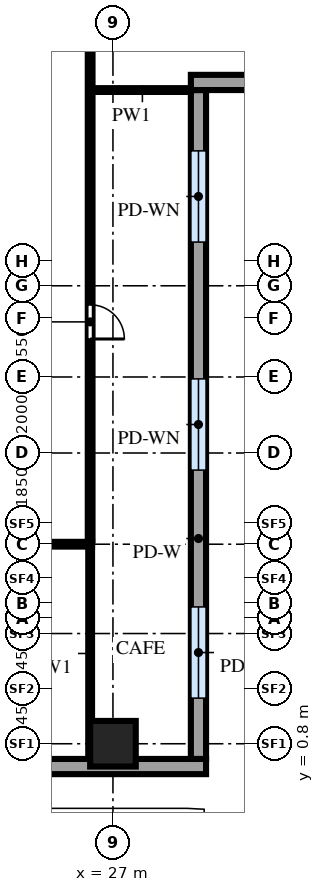
"""IFC4 building model, lengths in metres.
Left out: names, types, materials, properties, quantities, classifications, styles, units other than length and angle.
Written with IfcOpenShell. Run it as: python <this file> out.ifc"""

import sys

from ifc_helpers import new_model, si_unit, direction, frame, frame_2d, origin, origin_2d, place, context, subcontext, project, spatial, rectangle, extrude, source, transform, mapped, element, fill, save


model = new_model("IFC4")
c1 = context("Model", 3, precision=1e-05, world=origin(), true_north=direction((0.0, 1.0)))
c2 = subcontext(c1, "Body", "Model", "MODEL_VIEW")
j1 = project(units=[si_unit("LENGTHUNIT", "METRE"), si_unit("PLANEANGLEUNIT", "RADIAN")], contexts=[c1])
p1 = place(None, origin())
s1 = spatial("IfcSite", under=j1, at=p1, CompositionType="ELEMENT")
p2 = place(p1, origin())
s2 = spatial("IfcBuilding", under=s1, at=p2, CompositionType="ELEMENT")
p3 = place(p2, frame((0.0, 0.0, 7.5)))
s3 = spatial("IfcBuildingStorey", under=s2, at=p3, CompositionType="ELEMENT", Elevation=7.5)
m1 = source(origin(), c2, "Body", "SweptSolid", [
    extrude(rectangle(XDim=1.2, YDim=1.2, at=origin_2d()), origin(), (0.0, 0.0, 1.0), 5.2),
])
p4 = place(p3, frame((27.0, 0.8, 0.0), z_axis=(0.0, 0.0, 1.0), x_axis=(1.0, 0.0, 0.0)))
e1 = element("IfcColumn", 1, at=p4, inside=s3, PredefinedType="COLUMN", context=c2, shape_type="MappedRepresentation", body=[
    mapped(m1, transform((0.0, 0.0, 0.0))),
])
m2 = source(origin(), c2, "Body", "SweptSolid", [
    extrude(rectangle(XDim=31.24, YDim=0.4, at=frame_2d((15.62, 0.0))), origin(), (0.0, 0.0, 1.0), 5.2),
])
p5 = place(p3, frame((-1.79, 0.2, 0.0), z_axis=(0.0, 0.0, 1.0), x_axis=(1.0, 0.0, 0.0)))
e2 = element("IfcWall", 2, at=p5, inside=s3, PredefinedType="SOLIDWALL", context=c2, shape_type="MappedRepresentation", body=[
    mapped(m2, transform((0.0, 0.0, 0.0))),
])
m3 = source(origin(), c2, "Body", "SweptSolid", [
    extrude(rectangle(XDim=2.4, YDim=2.4, at=frame_2d((1.2, 1.2))), frame((0.0, 0.21, 0.0), z_axis=(0.0, -1.0, 0.0), x_axis=(1.0, 0.0, 0.0)), (0.0, 0.0, 1.0), 0.42),
])
p6 = place(p5, frame((2.4, 0.0, 1.0)))
e3 = element("IfcOpeningElement", 3, at=p6, cuts=e2, PredefinedType="OPENING", context=c2, shape_type="MappedRepresentation", body=[
    mapped(m3, transform((0.0, 0.0, 0.0))),
])
p7 = place(p5, frame((8.4, 0.0, 1.0)))
e4 = element("IfcOpeningElement", 4, at=p7, cuts=e2, PredefinedType="OPENING", context=c2, shape_type="MappedRepresentation", body=[
    mapped(m3, transform((0.0, 0.0, 0.0))),
])
m4 = source(origin(), c2, "Body", "SweptSolid", [
    extrude(rectangle(XDim=17.6, YDim=0.4, at=frame_2d((8.8, 0.0))), origin(), (0.0, 0.0, 1.0), 5.2),
])
p8 = place(p3, frame((29.25, 0.4, 0.0), z_axis=(0.0, 0.0, 1.0), x_axis=(0.0, 1.0, 0.0)))
e5 = element("IfcWall", 5, at=p8, inside=s3, PredefinedType="SOLIDWALL", context=c2, shape_type="MappedRepresentation", body=[
    mapped(m4, transform((0.0, 0.0, 0.0))),
])
p9 = place(p8, frame((1.6, 0.0, 1.0)))
e6 = element("IfcOpeningElement", 6, at=p9, cuts=e5, PredefinedType="OPENING", context=c2, shape_type="MappedRepresentation", body=[
    mapped(m3, transform((0.0, 0.0, 0.0))),
])
p10 = place(p8, frame((7.6, 0.0, 1.0)))
e7 = element("IfcOpeningElement", 7, at=p10, cuts=e5, PredefinedType="OPENING", context=c2, shape_type="MappedRepresentation", body=[
    mapped(m3, transform((0.0, 0.0, 0.0))),
])
p11 = place(p8, frame((13.6, 0.0, 1.0)))
e8 = element("IfcOpeningElement", 8, at=p11, cuts=e5, PredefinedType="OPENING", context=c2, shape_type="MappedRepresentation", body=[
    mapped(m3, transform((0.0, 0.0, 0.0))),
])
m5 = source(origin(), c2, "Body", "SweptSolid", [
    extrude(rectangle(XDim=13.5, YDim=0.4, at=frame_2d((6.75, 0.0))), origin(), (0.0, 0.0, 1.0), 5.2),
])
p12 = place(p3, frame((29.05, 18.2, 0.0), z_axis=(0.0, 0.0, 1.0), x_axis=(1.0, 0.0, 0.0)))
e9 = element("IfcWall", 9, at=p12, inside=s3, PredefinedType="SOLIDWALL", context=c2, shape_type="MappedRepresentation", body=[
    mapped(m5, transform((0.0, 0.0, 0.0))),
])
p13 = place(p12, frame((2.55, 0.0, 1.0)))
e10 = element("IfcOpeningElement", 10, at=p13, cuts=e9, PredefinedType="OPENING", context=c2, shape_type="MappedRepresentation", body=[
    mapped(m3, transform((0.0, 0.0, 0.0))),
])
p14 = place(p12, frame((8.55, 0.0, 1.0)))
e11 = element("IfcOpeningElement", 11, at=p14, cuts=e9, PredefinedType="OPENING", context=c2, shape_type="MappedRepresentation", body=[
    mapped(m3, transform((0.0, 0.0, 0.0))),
])
m6 = source(origin(), c2, "Body", "SweptSolid", [
    extrude(rectangle(XDim=5.55, YDim=0.1, at=frame_2d((2.775, 0.0))), origin(), (0.0, 0.0, 1.0), 5.2),
])
p15 = place(p3, frame((26.4, 0.4, 0.0), z_axis=(0.0, 0.0, 1.0), x_axis=(0.0, 1.0, 0.0)))
e12 = element("IfcWall", 12, at=p15, inside=s3, PredefinedType="PARTITIONING", context=c2, shape_type="MappedRepresentation", body=[
    mapped(m6, transform((0.0, 0.0, 0.0))),
])
m7 = source(origin(), c2, "Body", "SweptSolid", [
    extrude(rectangle(XDim=22.3, YDim=0.125, at=frame_2d((11.15, 0.0))), origin(), (0.0, 0.0, 1.0), 5.2),
])
p16 = place(p3, frame((4.15, 6.05, 0.0), z_axis=(0.0, 0.0, 1.0), x_axis=(1.0, 0.0, 0.0)))
e13 = element("IfcWall", 13, at=p16, inside=s3, PredefinedType="PARTITIONING", context=c2, shape_type="MappedRepresentation", body=[
    mapped(m7, transform((0.0, 0.0, 0.0))),
])
m8 = source(origin(), c2, "Body", "SweptSolid", [
    extrude(rectangle(XDim=1.2, YDim=2.1, at=frame_2d((0.6, 1.05))), frame((0.0, 0.073, 0.0), z_axis=(0.0, -1.0, 0.0), x_axis=(1.0, 0.0, 0.0)), (0.0, 0.0, 1.0), 0.145),
])
p17 = place(p16, frame((9.2, 0.0, 0.0)))
e14 = element("IfcOpeningElement", 14, at=p17, cuts=e13, PredefinedType="OPENING", context=c2, shape_type="MappedRepresentation", body=[
    mapped(m8, transform((0.0, 0.0, 0.0))),
])
m9 = source(origin(), c2, "Body", "SweptSolid", [
    extrude(rectangle(XDim=27.15, YDim=0.125, at=frame_2d((13.575, 0.0))), origin(), (0.0, 0.0, 1.0), 5.2),
])
p18 = place(p3, frame((26.4, 6.15, 0.0), z_axis=(0.0, 0.0, 1.0), x_axis=(0.0, 1.0, 0.0)))
e15 = element("IfcWall", 15, at=p18, inside=s3, PredefinedType="PARTITIONING", context=c2, shape_type="MappedRepresentation", body=[
    mapped(m9, transform((0.0, 0.0, 0.0))),
])
m10 = source(origin(), c2, "Body", "SweptSolid", [
    extrude(rectangle(XDim=0.9, YDim=2.1, at=frame_2d((0.45, 1.05))), frame((0.0, 0.073, 0.0), z_axis=(0.0, -1.0, 0.0), x_axis=(1.0, 0.0, 0.0)), (0.0, 0.0, 1.0), 0.145),
])
p19 = place(p18, frame((5.3, 0.0, 0.0)))
e16 = element("IfcOpeningElement", 16, at=p19, cuts=e15, PredefinedType="OPENING", context=c2, shape_type="MappedRepresentation", body=[
    mapped(m10, transform((0.0, 0.0, 0.0))),
])
p20 = place(p18, frame((13.25, 0.0, 0.0)))
e17 = element("IfcOpeningElement", 17, at=p20, cuts=e15, PredefinedType="OPENING", context=c2, shape_type="MappedRepresentation", body=[
    mapped(m8, transform((0.0, 0.0, 0.0))),
])
m11 = source(origin(), c2, "Body", "SweptSolid", [
    extrude(rectangle(XDim=2.55, YDim=0.1, at=frame_2d((1.275, 0.0))), origin(), (0.0, 0.0, 1.0), 5.2),
])
p21 = place(p3, frame((26.5, 18.0, 0.0), z_axis=(0.0, 0.0, 1.0), x_axis=(1.0, 0.0, 0.0)))
e18 = element("IfcWall", 18, at=p21, inside=s3, PredefinedType="PARTITIONING", context=c2, shape_type="MappedRepresentation", body=[
    mapped(m11, transform((0.0, 0.0, 0.0))),
])
m12 = source(origin(), c2, "Body", "SweptSolid", [
    extrude(rectangle(XDim=2.4, YDim=2.4, at=frame_2d((1.2, 1.2))), frame((0.0, 0.03, 0.0), z_axis=(0.0, -1.0, 0.0), x_axis=(1.0, 0.0, 0.0)), (0.0, 0.0, 1.0), 0.06),
])
p22 = place(p9, origin())
e19 = element("IfcWindow", 19, at=p22, inside=s3, PartitioningType="SINGLE_PANEL", PredefinedType="WINDOW", context=c2, shape_type="MappedRepresentation", body=[
    mapped(m12, transform((0.0, 0.0, 0.0))),
])
fill(e6, e19)
p23 = place(p10, origin())
e20 = element("IfcWindow", 20, at=p23, inside=s3, PartitioningType="SINGLE_PANEL", PredefinedType="WINDOW", context=c2, shape_type="MappedRepresentation", body=[
    mapped(m12, transform((0.0, 0.0, 0.0))),
])
fill(e7, e20)
p24 = place(p11, origin())
e21 = element("IfcWindow", 21, at=p24, inside=s3, PartitioningType="SINGLE_PANEL", PredefinedType="WINDOW", context=c2, shape_type="MappedRepresentation", body=[
    mapped(m12, transform((0.0, 0.0, 0.0))),
])
fill(e8, e21)
m13 = source(origin(), c2, "Body", "SweptSolid", [
    extrude(rectangle(XDim=0.9, YDim=2.1, at=frame_2d((0.45, 1.05))), frame((0.0, 0.025, 0.0), z_axis=(0.0, -1.0, 0.0), x_axis=(1.0, 0.0, 0.0)), (0.0, 0.0, 1.0), 0.05),
])
p25 = place(p19, origin())
e22 = element("IfcDoor", 22, at=p25, inside=s3, OperationType="SINGLE_SWING_LEFT", PredefinedType="DOOR", context=c2, shape_type="MappedRepresentation", body=[
    mapped(m13, transform((0.0, 0.0, 0.0))),
])
fill(e16, e22)
save(model, sys.argv[1])
